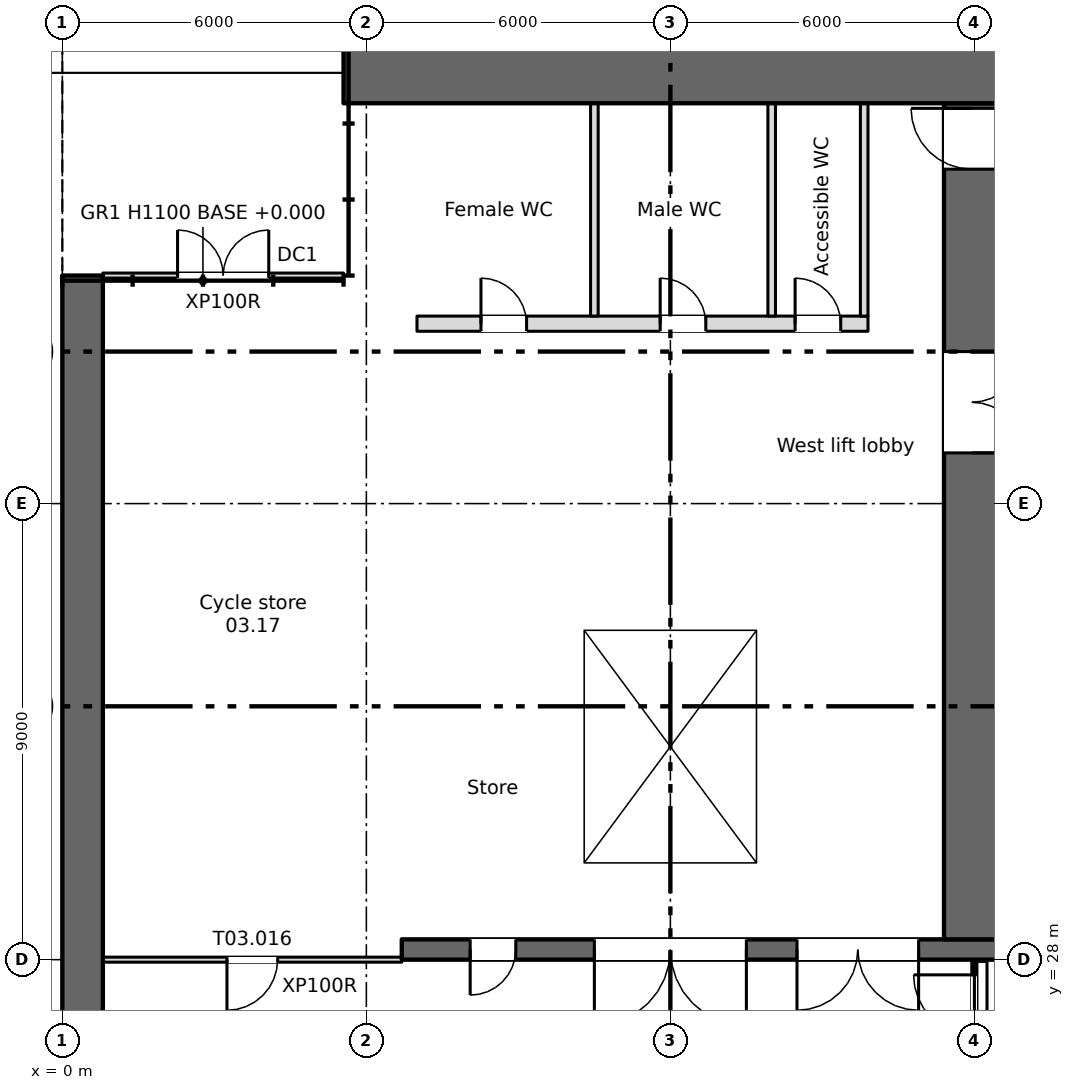
"""IFC4 building model, lengths in metres.
Left out: names, types, materials, properties, quantities, classifications, styles, units other than length and angle.
Written with IfcOpenShell. Run it as: python <this file> out.ifc"""

import sys

from ifc_helpers import new_model, si_unit, direction, frame, frame_2d, origin, place, context, subcontext, project, spatial, rectangle, extrude, element, fill, save


model = new_model("IFC4")
c1 = context("Model", 3, precision=1e-05, world=origin(), true_north=direction((0.0, 1.0)))
c2 = subcontext(c1, "Body", "Model", "MODEL_VIEW")
j1 = project(units=[si_unit("LENGTHUNIT", "METRE"), si_unit("PLANEANGLEUNIT", "RADIAN")], contexts=[c1])
p1 = place(None, origin())
s1 = spatial("IfcSite", under=j1, at=p1, CompositionType="ELEMENT")
p2 = place(p1, origin())
s2 = spatial("IfcBuilding", under=s1, at=p2, CompositionType="ELEMENT")
p3 = place(p2, origin())
s3 = spatial("IfcBuildingStorey", under=s2, at=p3, CompositionType="ELEMENT", Elevation=0.0)
p4 = place(p3, frame((0.4, 4.5, 0.0), z_axis=(0.0, 0.0, 1.0), x_axis=(0.0, 1.0, 0.0)))
e1 = element("IfcWall", 1, at=p4, inside=s3, PredefinedType="SHEAR", context=c2, shape_type="SweptSolid", body=[
    extrude(rectangle(XDim=37.0, YDim=0.8, at=frame_2d((18.5, 0.0))), origin(), (0.0, 0.0, 1.0), 6.0),
])
p5 = place(p3, frame((5.55, 45.45, 0.0), z_axis=(0.0, 0.0, 1.0), x_axis=(1.0, 0.0, 0.0)))
e2 = element("IfcWall", 2, at=p5, inside=s3, PredefinedType="SHEAR", context=c2, shape_type="SweptSolid", body=[
    extrude(rectangle(XDim=66.9, YDim=1.1, at=frame_2d((33.45, 0.0))), origin(), (0.0, 0.0, 1.0), 6.0),
])
p6 = place(p5, frame((61.45, 0.0, 0.0)))
e3 = element("IfcOpeningElement", 3, at=p6, cuts=e2, PredefinedType="OPENING", context=c2, shape_type="SweptSolid", body=[
    extrude(rectangle(XDim=3.0, YDim=3.0, at=frame_2d((1.5, 1.5))), frame((0.0, 0.56, 0.0), z_axis=(0.0, -1.0, 0.0), x_axis=(1.0, 0.0, 0.0)), (0.0, 0.0, 1.0), 1.12),
])
p7 = place(p3, frame((73.0, 28.2, 0.0), z_axis=(0.0, 0.0, 1.0), x_axis=(-1.0, 0.0, 0.0)))
e4 = element("IfcWall", 4, at=p7, inside=s3, PredefinedType="SHEAR", context=c2, shape_type="SweptSolid", body=[
    extrude(rectangle(XDim=66.3, YDim=0.4, at=frame_2d((33.15, 0.0))), origin(), (0.0, 0.0, 1.0), 6.0),
])
p8 = place(p7, frame((51.55, 0.0, 0.0)))
e5 = element("IfcOpeningElement", 5, at=p8, cuts=e4, PredefinedType="OPENING", context=c2, shape_type="SweptSolid", body=[
    extrude(rectangle(XDim=0.9, YDim=2.1, at=frame_2d((0.45, 1.05))), frame((0.0, 0.21, 0.0), z_axis=(0.0, -1.0, 0.0), x_axis=(1.0, 0.0, 0.0)), (0.0, 0.0, 1.0), 0.42),
])
p9 = place(p7, frame((16.837, 0.0, 0.0)))
e6 = element("IfcOpeningElement", 6, at=p9, cuts=e4, PredefinedType="OPENING", context=c2, shape_type="SweptSolid", body=[
    extrude(rectangle(XDim=0.9, YDim=2.1, at=frame_2d((0.45, 1.05))), frame((0.0, 0.21, 0.0), z_axis=(0.0, -1.0, 0.0), x_axis=(1.0, 0.0, 0.0)), (0.0, 0.0, 1.0), 0.42),
])
p10 = place(p7, frame((14.262, 0.0, 0.0)))
e7 = element("IfcOpeningElement", 7, at=p10, cuts=e4, PredefinedType="OPENING", context=c2, shape_type="SweptSolid", body=[
    extrude(rectangle(XDim=0.9, YDim=2.1, at=frame_2d((0.45, 1.05))), frame((0.0, 0.21, 0.0), z_axis=(0.0, -1.0, 0.0), x_axis=(1.0, 0.0, 0.0)), (0.0, 0.0, 1.0), 0.42),
])
p11 = place(p7, frame((64.05, 0.0, 0.0)))
e8 = element("IfcOpeningElement", 8, at=p11, cuts=e4, PredefinedType="OPENING", context=c2, shape_type="SweptSolid", body=[
    extrude(rectangle(XDim=0.9, YDim=2.1, at=frame_2d((0.45, 1.05))), frame((0.0, 0.21, 0.0), z_axis=(0.0, -1.0, 0.0), x_axis=(1.0, 0.0, 0.0)), (0.0, 0.0, 1.0), 0.42),
])
p12 = place(p7, frame((6.038, 0.0, 0.0)))
e9 = element("IfcOpeningElement", 9, at=p12, cuts=e4, PredefinedType="OPENING", context=c2, shape_type="SweptSolid", body=[
    extrude(rectangle(XDim=0.9, YDim=2.1, at=frame_2d((0.45, 1.05))), frame((0.0, 0.21, 0.0), z_axis=(0.0, -1.0, 0.0), x_axis=(1.0, 0.0, 0.0)), (0.0, 0.0, 1.0), 0.42),
])
p13 = place(p7, frame((1.863, 0.0, 0.0)))
e10 = element("IfcOpeningElement", 10, at=p13, cuts=e4, PredefinedType="OPENING", context=c2, shape_type="SweptSolid", body=[
    extrude(rectangle(XDim=0.9, YDim=2.1, at=frame_2d((0.45, 1.05))), frame((0.0, 0.21, 0.0), z_axis=(0.0, -1.0, 0.0), x_axis=(1.0, 0.0, 0.0)), (0.0, 0.0, 1.0), 0.42),
])
p14 = place(p7, frame((59.5, 0.0, 0.0)))
e11 = element("IfcOpeningElement", 11, at=p14, cuts=e4, PredefinedType="OPENING", context=c2, shape_type="SweptSolid", body=[
    extrude(rectangle(XDim=3.0, YDim=2.1, at=frame_2d((1.5, 1.05))), frame((0.0, 0.21, 0.0), z_axis=(0.0, -1.0, 0.0), x_axis=(1.0, 0.0, 0.0)), (0.0, 0.0, 1.0), 0.42),
])
p15 = place(p7, frame((32.5, 0.0, 0.0)))
e12 = element("IfcOpeningElement", 12, at=p15, cuts=e4, PredefinedType="OPENING", context=c2, shape_type="SweptSolid", body=[
    extrude(rectangle(XDim=3.0, YDim=2.1, at=frame_2d((1.5, 1.05))), frame((0.0, 0.21, 0.0), z_axis=(0.0, -1.0, 0.0), x_axis=(1.0, 0.0, 0.0)), (0.0, 0.0, 1.0), 0.42),
])
p16 = place(p7, frame((9.0, 0.0, 0.0)))
e13 = element("IfcOpeningElement", 13, at=p16, cuts=e4, PredefinedType="OPENING", context=c2, shape_type="SweptSolid", body=[
    extrude(rectangle(XDim=3.0, YDim=2.1, at=frame_2d((1.5, 1.05))), frame((0.0, 0.21, 0.0), z_axis=(0.0, -1.0, 0.0), x_axis=(1.0, 0.0, 0.0)), (0.0, 0.0, 1.0), 0.42),
])
p17 = place(p7, frame((43.0, 0.0, 0.0)))
e14 = element("IfcOpeningElement", 14, at=p17, cuts=e4, PredefinedType="OPENING", context=c2, shape_type="SweptSolid", body=[
    extrude(rectangle(XDim=2.0, YDim=2.1, at=frame_2d((1.0, 1.05))), frame((0.0, 0.21, 0.0), z_axis=(0.0, -1.0, 0.0), x_axis=(1.0, 0.0, 0.0)), (0.0, 0.0, 1.0), 0.42),
])
p18 = place(p7, frame((23.0, 0.0, 0.0)))
e15 = element("IfcOpeningElement", 15, at=p18, cuts=e4, PredefinedType="OPENING", context=c2, shape_type="SweptSolid", body=[
    extrude(rectangle(XDim=2.0, YDim=2.1, at=frame_2d((1.0, 1.05))), frame((0.0, 0.21, 0.0), z_axis=(0.0, -1.0, 0.0), x_axis=(1.0, 0.0, 0.0)), (0.0, 0.0, 1.0), 0.42),
])
p19 = place(p7, frame((39.05, 0.0, 0.0)))
e16 = element("IfcOpeningElement", 16, at=p19, cuts=e4, PredefinedType="OPENING", context=c2, shape_type="SweptSolid", body=[
    extrude(rectangle(XDim=2.4, YDim=2.1, at=frame_2d((1.2, 1.05))), frame((0.0, 0.21, 0.0), z_axis=(0.0, -1.0, 0.0), x_axis=(1.0, 0.0, 0.0)), (0.0, 0.0, 1.0), 0.42),
])
p20 = place(p7, frame((26.55, 0.0, 0.0)))
e17 = element("IfcOpeningElement", 17, at=p20, cuts=e4, PredefinedType="OPENING", context=c2, shape_type="SweptSolid", body=[
    extrude(rectangle(XDim=2.4, YDim=2.1, at=frame_2d((1.2, 1.05))), frame((0.0, 0.21, 0.0), z_axis=(0.0, -1.0, 0.0), x_axis=(1.0, 0.0, 0.0)), (0.0, 0.0, 1.0), 0.42),
])
p21 = place(p7, frame((56.1, 0.0, 0.0)))
e18 = element("IfcOpeningElement", 18, at=p21, cuts=e4, PredefinedType="OPENING", context=c2, shape_type="SweptSolid", body=[
    extrude(rectangle(XDim=2.4, YDim=2.1, at=frame_2d((1.2, 1.05))), frame((0.0, 0.21, 0.0), z_axis=(0.0, -1.0, 0.0), x_axis=(1.0, 0.0, 0.0)), (0.0, 0.0, 1.0), 0.42),
])
p22 = place(p7, frame((36.55, 0.0, 0.0)))
e19 = element("IfcOpeningElement", 19, at=p22, cuts=e4, PredefinedType="OPENING", context=c2, shape_type="SweptSolid", body=[
    extrude(rectangle(XDim=0.9, YDim=2.1, at=frame_2d((0.45, 1.05))), frame((0.0, 0.21, 0.0), z_axis=(0.0, -1.0, 0.0), x_axis=(1.0, 0.0, 0.0)), (0.0, 0.0, 1.0), 0.42),
])
p23 = place(p7, frame((30.55, 0.0, 0.0)))
e20 = element("IfcOpeningElement", 20, at=p23, cuts=e4, PredefinedType="OPENING", context=c2, shape_type="SweptSolid", body=[
    extrude(rectangle(XDim=0.9, YDim=2.1, at=frame_2d((0.45, 1.05))), frame((0.0, 0.21, 0.0), z_axis=(0.0, -1.0, 0.0), x_axis=(1.0, 0.0, 0.0)), (0.0, 0.0, 1.0), 0.42),
])
p24 = place(p3, frame((6.85, 28.4, 0.0), z_axis=(0.0, 0.0, 1.0), x_axis=(0.0, 1.0, 0.0)))
e21 = element("IfcWall", 21, at=p24, inside=s3, PredefinedType="SHEAR", context=c2, shape_type="SweptSolid", body=[
    extrude(rectangle(XDim=16.5, YDim=0.3, at=frame_2d((8.25, 0.0))), origin(), (0.0, 0.0, 1.0), 6.0),
])
p25 = place(p3, frame((17.95, 28.4, 0.0), z_axis=(0.0, 0.0, 1.0), x_axis=(0.0, 1.0, 0.0)))
e22 = element("IfcWall", 22, at=p25, inside=s3, PredefinedType="SHEAR", context=c2, shape_type="SweptSolid", body=[
    extrude(rectangle(XDim=16.5, YDim=1.1, at=frame_2d((8.25, 0.0))), origin(), (0.0, 0.0, 1.0), 6.0),
])
p26 = place(p25, frame((9.6, 0.0, 0.0)))
e23 = element("IfcOpeningElement", 23, at=p26, cuts=e22, PredefinedType="OPENING", context=c2, shape_type="SweptSolid", body=[
    extrude(rectangle(XDim=2.0, YDim=2.1, at=frame_2d((1.0, 1.05))), frame((0.0, 0.56, 0.0), z_axis=(0.0, -1.0, 0.0), x_axis=(1.0, 0.0, 0.0)), (0.0, 0.0, 1.0), 1.12),
])
p27 = place(p25, frame((15.2, 0.0, 0.0)))
e24 = element("IfcOpeningElement", 24, at=p27, cuts=e22, PredefinedType="OPENING", context=c2, shape_type="SweptSolid", body=[
    extrude(rectangle(XDim=1.2, YDim=2.1, at=frame_2d((0.6, 1.05))), frame((0.0, 0.56, 0.0), z_axis=(0.0, -1.0, 0.0), x_axis=(1.0, 0.0, 0.0)), (0.0, 0.0, 1.0), 1.12),
])
for number, where, z_axis, x_axis in (
    (25, (10.15, 28.4, 0.0), (0.0, 0.0, 1.0), (0.0, 1.0, 0.0)),
    (26, (13.85, 28.4, 0.0), (0.0, 0.0, 1.0), (0.0, 1.0, 0.0)),
):
    element("IfcWall", number, at=place(p3, frame(where, z_axis=z_axis, x_axis=x_axis)), inside=s3, PredefinedType="SHEAR", context=c2, shape_type="SweptSolid", body=[
        extrude(rectangle(XDim=6.1, YDim=0.3, at=frame_2d((3.05, 0.0))), origin(), (0.0, 0.0, 1.0), 6.0),
    ])
p28 = place(p3, frame((7.0, 34.65, 0.0), z_axis=(0.0, 0.0, 1.0), x_axis=(1.0, 0.0, 0.0)))
e27 = element("IfcWall", 27, at=p28, inside=s3, PredefinedType="SHEAR", context=c2, shape_type="SweptSolid", body=[
    extrude(rectangle(XDim=7.0, YDim=0.3, at=frame_2d((3.5, 0.0))), origin(), (0.0, 0.0, 1.0), 6.0),
])
p29 = place(p3, frame((7.0, 37.45, 0.0), z_axis=(0.0, 0.0, 1.0), x_axis=(1.0, 0.0, 0.0)))
e28 = element("IfcWall", 28, at=p29, inside=s3, PredefinedType="SHEAR", context=c2, shape_type="SweptSolid", body=[
    extrude(rectangle(XDim=7.0, YDim=0.3, at=frame_2d((3.5, 0.0))), origin(), (0.0, 0.0, 1.0), 6.0),
])
p30 = place(p29, frame((1.05, 0.0, 0.0)))
e29 = element("IfcOpeningElement", 29, at=p30, cuts=e28, PredefinedType="OPENING", context=c2, shape_type="SweptSolid", body=[
    extrude(rectangle(XDim=1.1, YDim=2.1, at=frame_2d((0.55, 1.05))), frame((0.0, 0.16, 0.0), z_axis=(0.0, -1.0, 0.0), x_axis=(1.0, 0.0, 0.0)), (0.0, 0.0, 1.0), 0.32),
])
p31 = place(p29, frame((4.55, 0.0, 0.0)))
e30 = element("IfcOpeningElement", 30, at=p31, cuts=e28, PredefinedType="OPENING", context=c2, shape_type="SweptSolid", body=[
    extrude(rectangle(XDim=1.1, YDim=2.1, at=frame_2d((0.55, 1.05))), frame((0.0, 0.16, 0.0), z_axis=(0.0, -1.0, 0.0), x_axis=(1.0, 0.0, 0.0)), (0.0, 0.0, 1.0), 0.32),
])
p32 = place(p3, frame((13.85, 34.8, 0.0), z_axis=(0.0, 0.0, 1.0), x_axis=(0.0, 1.0, 0.0)))
e31 = element("IfcWall", 31, at=p32, inside=s3, PredefinedType="SHEAR", context=c2, shape_type="SweptSolid", body=[
    extrude(rectangle(XDim=2.5, YDim=0.3, at=frame_2d((1.25, 0.0))), origin(), (0.0, 0.0, 1.0), 6.0),
])
p33 = place(p3, frame((7.0, 40.55, 0.0), z_axis=(0.0, 0.0, 1.0), x_axis=(1.0, 0.0, 0.0)))
e32 = element("IfcWall", 32, at=p33, inside=s3, PredefinedType="PARTITIONING", context=c2, shape_type="SweptSolid", body=[
    extrude(rectangle(XDim=8.9, YDim=0.3, at=frame_2d((4.45, 0.0))), origin(), (0.0, 0.0, 1.0), 6.0),
])
p34 = place(p33, frame((1.262, 0.0, 0.0)))
e33 = element("IfcOpeningElement", 33, at=p34, cuts=e32, PredefinedType="OPENING", context=c2, shape_type="SweptSolid", body=[
    extrude(rectangle(XDim=0.9, YDim=2.1, at=frame_2d((0.45, 1.05))), frame((0.0, 0.16, 0.0), z_axis=(0.0, -1.0, 0.0), x_axis=(1.0, 0.0, 0.0)), (0.0, 0.0, 1.0), 0.32),
])
p35 = place(p33, frame((4.8, 0.0, 0.0)))
e34 = element("IfcOpeningElement", 34, at=p35, cuts=e32, PredefinedType="OPENING", context=c2, shape_type="SweptSolid", body=[
    extrude(rectangle(XDim=0.9, YDim=2.1, at=frame_2d((0.45, 1.05))), frame((0.0, 0.16, 0.0), z_axis=(0.0, -1.0, 0.0), x_axis=(1.0, 0.0, 0.0)), (0.0, 0.0, 1.0), 0.32),
])
p36 = place(p33, frame((7.462, 0.0, 0.0)))
e35 = element("IfcOpeningElement", 35, at=p36, cuts=e32, PredefinedType="OPENING", context=c2, shape_type="SweptSolid", body=[
    extrude(rectangle(XDim=0.9, YDim=2.1, at=frame_2d((0.45, 1.05))), frame((0.0, 0.16, 0.0), z_axis=(0.0, -1.0, 0.0), x_axis=(1.0, 0.0, 0.0)), (0.0, 0.0, 1.0), 0.32),
])
p37 = place(p3, frame((10.35, 34.8, 0.0), z_axis=(0.0, 0.0, 1.0), x_axis=(0.0, 1.0, 0.0)))
e36 = element("IfcWall", 36, at=p37, inside=s3, PredefinedType="SHEAR", context=c2, shape_type="SweptSolid", body=[
    extrude(rectangle(XDim=2.5, YDim=0.3, at=frame_2d((1.25, 0.0))), origin(), (0.0, 0.0, 1.0), 6.0),
])
for number, where, z_axis, x_axis in (
    (37, (15.825, 40.7, 0.0), (0.0, 0.0, 1.0), (0.0, 1.0, 0.0)),
    (38, (10.5, 40.7, 0.0), (0.0, 0.0, 1.0), (0.0, 1.0, 0.0)),
    (39, (14.0, 40.7, 0.0), (0.0, 0.0, 1.0), (0.0, 1.0, 0.0)),
):
    element("IfcWall", number, at=place(p3, frame(where, z_axis=z_axis, x_axis=x_axis)), inside=s3, PredefinedType="PARTITIONING", context=c2, shape_type="SweptSolid", body=[
        extrude(rectangle(XDim=4.2, YDim=0.15, at=frame_2d((2.1, 0.0))), origin(), (0.0, 0.0, 1.0), 6.0),
    ])
p38 = place(p3, frame((0.8, 28.0, 0.0), z_axis=(0.0, 0.0, 1.0), x_axis=(1.0, 0.0, 0.0)))
e40 = element("IfcWall", 40, at=p38, inside=s3, PredefinedType="PARTITIONING", context=c2, shape_type="SweptSolid", body=[
    extrude(rectangle(XDim=5.9, YDim=0.1, at=frame_2d((2.95, 0.0))), origin(), (0.0, 0.0, 1.0), 6.0),
])
p39 = place(p38, frame((2.45, 0.0, 0.0)))
e41 = element("IfcOpeningElement", 41, at=p39, cuts=e40, PredefinedType="OPENING", context=c2, shape_type="SweptSolid", body=[
    extrude(rectangle(XDim=1.0, YDim=2.1, at=frame_2d((0.5, 1.05))), frame((0.0, 0.06, 0.0), z_axis=(0.0, -1.0, 0.0), x_axis=(1.0, 0.0, 0.0)), (0.0, 0.0, 1.0), 0.12),
])
p40 = place(p3, frame((0.8, 41.5, 0.0), z_axis=(0.0, 0.0, 1.0), x_axis=(1.0, 0.0, 0.0)))
e42 = element("IfcWall", 42, at=p40, inside=s3, PredefinedType="PARTITIONING", context=c2, shape_type="SweptSolid", body=[
    extrude(rectangle(XDim=4.75, YDim=0.1, at=frame_2d((2.375, 0.0))), origin(), (0.0, 0.0, 1.0), 6.0),
])
p41 = place(p40, frame((1.475, 0.0, 0.0)))
e43 = element("IfcOpeningElement", 43, at=p41, cuts=e42, PredefinedType="OPENING", context=c2, shape_type="SweptSolid", body=[
    extrude(rectangle(XDim=1.8, YDim=2.4, at=frame_2d((0.9, 1.2))), frame((0.0, 0.06, 0.0), z_axis=(0.0, -1.0, 0.0), x_axis=(1.0, 0.0, 0.0)), (0.0, 0.0, 1.0), 0.12),
])
p42 = place(p3, frame((18.0, 11.25, 0.0), z_axis=(0.0, 0.0, 1.0), x_axis=(0.0, 1.0, 0.0)))
e44 = element("IfcWall", 44, at=p42, inside=s3, PredefinedType="PARTITIONING", context=c2, shape_type="SweptSolid", body=[
    extrude(rectangle(XDim=16.75, YDim=0.1, at=frame_2d((8.375, 0.0))), origin(), (0.0, 0.0, 1.0), 6.0),
])
p43 = place(p42, frame((14.05, 0.0, 0.0)))
e45 = element("IfcOpeningElement", 45, at=p43, cuts=e44, PredefinedType="OPENING", context=c2, shape_type="SweptSolid", body=[
    extrude(rectangle(XDim=2.4, YDim=2.1, at=frame_2d((1.2, 1.05))), frame((0.0, 0.06, 0.0), z_axis=(0.0, -1.0, 0.0), x_axis=(1.0, 0.0, 0.0)), (0.0, 0.0, 1.0), 0.12),
])
p44 = place(p42, frame((9.25, 0.0, 0.0)))
e46 = element("IfcOpeningElement", 46, at=p44, cuts=e44, PredefinedType="OPENING", context=c2, shape_type="SweptSolid", body=[
    extrude(rectangle(XDim=1.0, YDim=2.1, at=frame_2d((0.5, 1.05))), frame((0.0, 0.06, 0.0), z_axis=(0.0, -1.0, 0.0), x_axis=(1.0, 0.0, 0.0)), (0.0, 0.0, 1.0), 0.12),
])
p45 = place(p11, origin())
e47 = element("IfcDoor", 47, at=p45, inside=s3, OperationType="SINGLE_SWING_RIGHT", PredefinedType="DOOR", context=c2, shape_type="SweptSolid", body=[
    extrude(rectangle(XDim=0.9, YDim=2.1, at=frame_2d((0.45, 1.05))), frame((0.0, 0.025, 0.0), z_axis=(0.0, -1.0, 0.0), x_axis=(1.0, 0.0, 0.0)), (0.0, 0.0, 1.0), 0.05),
])
fill(e8, e47)
p46 = place(p34, origin())
e48 = element("IfcDoor", 48, at=p46, inside=s3, OperationType="SINGLE_SWING_LEFT", PredefinedType="DOOR", context=c2, shape_type="SweptSolid", body=[
    extrude(rectangle(XDim=0.9, YDim=2.1, at=frame_2d((0.45, 1.05))), frame((0.0, 0.025, 0.0), z_axis=(0.0, -1.0, 0.0), x_axis=(1.0, 0.0, 0.0)), (0.0, 0.0, 1.0), 0.05),
])
fill(e33, e48)
p47 = place(p35, origin())
e49 = element("IfcDoor", 49, at=p47, inside=s3, OperationType="SINGLE_SWING_LEFT", PredefinedType="DOOR", context=c2, shape_type="SweptSolid", body=[
    extrude(rectangle(XDim=0.9, YDim=2.1, at=frame_2d((0.45, 1.05))), frame((0.0, 0.025, 0.0), z_axis=(0.0, -1.0, 0.0), x_axis=(1.0, 0.0, 0.0)), (0.0, 0.0, 1.0), 0.05),
])
fill(e34, e49)
p48 = place(p36, origin())
e50 = element("IfcDoor", 50, at=p48, inside=s3, OperationType="SINGLE_SWING_LEFT", PredefinedType="DOOR", context=c2, shape_type="SweptSolid", body=[
    extrude(rectangle(XDim=0.9, YDim=2.1, at=frame_2d((0.45, 1.05))), frame((0.0, 0.025, 0.0), z_axis=(0.0, -1.0, 0.0), x_axis=(1.0, 0.0, 0.0)), (0.0, 0.0, 1.0), 0.05),
])
fill(e35, e50)
p49 = place(p30, origin())
e51 = element("IfcDoor", 51, at=p49, inside=s3, OperationType="SLIDING_TO_LEFT", PredefinedType="DOOR", context=c2, shape_type="SweptSolid", body=[
    extrude(rectangle(XDim=1.1, YDim=2.1, at=frame_2d((0.55, 1.05))), frame((0.0, 0.025, 0.0), z_axis=(0.0, -1.0, 0.0), x_axis=(1.0, 0.0, 0.0)), (0.0, 0.0, 1.0), 0.05),
])
fill(e29, e51)
p50 = place(p31, origin())
e52 = element("IfcDoor", 52, at=p50, inside=s3, OperationType="SLIDING_TO_LEFT", PredefinedType="DOOR", context=c2, shape_type="SweptSolid", body=[
    extrude(rectangle(XDim=1.1, YDim=2.1, at=frame_2d((0.55, 1.05))), frame((0.0, 0.025, 0.0), z_axis=(0.0, -1.0, 0.0), x_axis=(1.0, 0.0, 0.0)), (0.0, 0.0, 1.0), 0.05),
])
fill(e30, e52)
p51 = place(p14, origin())
e53 = element("IfcDoor", 53, at=p51, inside=s3, OperationType="DOUBLE_DOOR_SINGLE_SWING", PredefinedType="DOOR", context=c2, shape_type="SweptSolid", body=[
    extrude(rectangle(XDim=3.0, YDim=2.1, at=frame_2d((1.5, 1.05))), frame((0.0, 0.025, 0.0), z_axis=(0.0, -1.0, 0.0), x_axis=(1.0, 0.0, 0.0)), (0.0, 0.0, 1.0), 0.05),
])
fill(e11, e53)
p52 = place(p21, origin())
e54 = element("IfcDoor", 54, at=p52, inside=s3, OperationType="DOUBLE_DOOR_SINGLE_SWING", PredefinedType="DOOR", context=c2, shape_type="SweptSolid", body=[
    extrude(rectangle(XDim=2.4, YDim=2.1, at=frame_2d((1.2, 1.05))), frame((0.0, 0.025, 0.0), z_axis=(0.0, -1.0, 0.0), x_axis=(1.0, 0.0, 0.0)), (0.0, 0.0, 1.0), 0.05),
])
fill(e18, e54)
p53 = place(p26, origin())
e55 = element("IfcDoor", 55, at=p53, inside=s3, OperationType="DOUBLE_DOOR_SINGLE_SWING", PredefinedType="DOOR", context=c2, shape_type="SweptSolid", body=[
    extrude(rectangle(XDim=2.0, YDim=2.1, at=frame_2d((1.0, 1.05))), frame((0.0, 0.025, 0.0), z_axis=(0.0, -1.0, 0.0), x_axis=(1.0, 0.0, 0.0)), (0.0, 0.0, 1.0), 0.05),
])
fill(e23, e55)
p54 = place(p27, origin())
e56 = element("IfcDoor", 56, at=p54, inside=s3, OperationType="SINGLE_SWING_RIGHT", PredefinedType="DOOR", context=c2, shape_type="SweptSolid", body=[
    extrude(rectangle(XDim=1.2, YDim=2.1, at=frame_2d((0.6, 1.05))), frame((0.0, 0.025, 0.0), z_axis=(0.0, -1.0, 0.0), x_axis=(1.0, 0.0, 0.0)), (0.0, 0.0, 1.0), 0.05),
])
fill(e24, e56)
p55 = place(p43, origin())
e57 = element("IfcDoor", 57, at=p55, inside=s3, OperationType="DOUBLE_DOOR_SINGLE_SWING", PredefinedType="DOOR", context=c2, shape_type="SweptSolid", body=[
    extrude(rectangle(XDim=2.4, YDim=2.1, at=frame_2d((1.2, 1.05))), frame((0.0, 0.025, 0.0), z_axis=(0.0, -1.0, 0.0), x_axis=(1.0, 0.0, 0.0)), (0.0, 0.0, 1.0), 0.05),
])
fill(e45, e57)
p56 = place(p39, frame((1.0, 0.0, 0.0), z_axis=(0.0, 0.0, 1.0), x_axis=(-1.0, 0.0, 0.0)))
e58 = element("IfcDoor", 58, at=p56, inside=s3, OperationType="SINGLE_SWING_RIGHT", PredefinedType="DOOR", context=c2, shape_type="SweptSolid", body=[
    extrude(rectangle(XDim=1.0, YDim=2.1, at=frame_2d((0.5, 1.05))), frame((0.0, 0.025, 0.0), z_axis=(0.0, -1.0, 0.0), x_axis=(1.0, 0.0, 0.0)), (0.0, 0.0, 1.0), 0.05),
])
fill(e41, e58)
p57 = place(p41, origin())
e59 = element("IfcDoor", 59, at=p57, inside=s3, OperationType="DOUBLE_DOOR_SINGLE_SWING", PredefinedType="DOOR", context=c2, shape_type="SweptSolid", body=[
    extrude(rectangle(XDim=1.8, YDim=2.4, at=frame_2d((0.9, 1.2))), frame((0.0, 0.025, 0.0), z_axis=(0.0, -1.0, 0.0), x_axis=(1.0, 0.0, 0.0)), (0.0, 0.0, 1.0), 0.05),
])
fill(e43, e59)
save(model, sys.argv[1])
